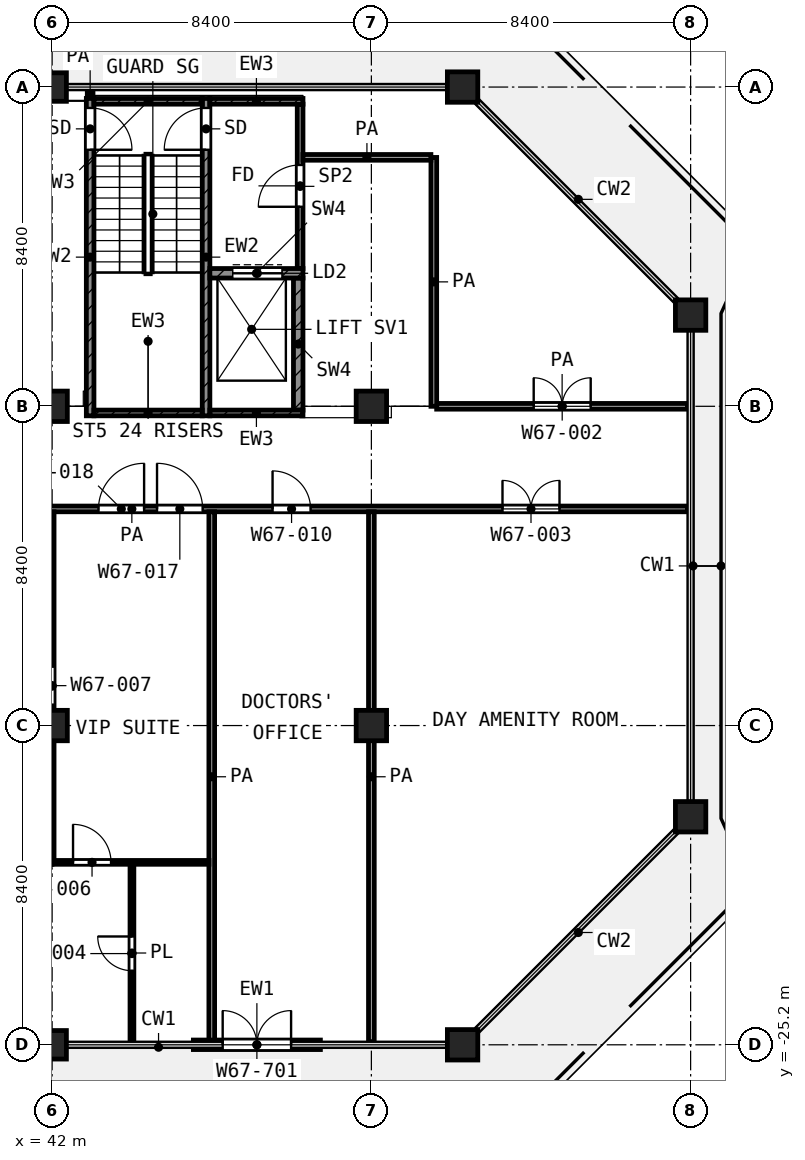
"""IFC4 building model, lengths in metres.
Left out: names, types, materials, properties, quantities, classifications, styles, units other than length and angle.
Written with IfcOpenShell. Run it as: python <this file> out.ifc"""

import sys

from ifc_helpers import new_model, si_unit, direction, frame, frame_2d, origin, origin_2d, place, context, subcontext, project, spatial, rectangle, extrude, element, fill, save


model = new_model("IFC4")
c1 = context("Model", 3, precision=1e-05, world=origin(), true_north=direction((0.0, 1.0)))
c2 = subcontext(c1, "Body", "Model", "MODEL_VIEW")
j1 = project(units=[si_unit("LENGTHUNIT", "METRE"), si_unit("PLANEANGLEUNIT", "RADIAN")], contexts=[c1])
p1 = place(None, origin())
s1 = spatial("IfcSite", under=j1, at=p1, CompositionType="ELEMENT")
p2 = place(p1, origin())
s2 = spatial("IfcBuilding", under=s1, at=p2, CompositionType="ELEMENT")
p3 = place(p2, frame((0.0, 0.0, 290.2)))
s3 = spatial("IfcBuildingStorey", under=s2, at=p3, CompositionType="ELEMENT", Elevation=290.2)
p4 = place(p3, frame((42.0, 0.0, 0.0), z_axis=(0.0, 0.0, 1.0), x_axis=(1.0, 0.0, 0.0)))
e1 = element("IfcColumn", 1, at=p4, inside=s3, PredefinedType="COLUMN", context=c2, shape_type="SweptSolid", body=[
    extrude(rectangle(XDim=0.75, YDim=0.75, at=origin_2d()), origin(), (0.0, 0.0, 1.0), 4.2),
])
for number, where, z_axis, x_axis in (
    (2, (52.8, 0.0, 0.0), (0.0, 0.0, 1.0), (1.0, 0.0, 0.0)),
    (3, (58.8, -6.0, 0.0), (0.0, 0.0, 1.0), (1.0, 0.0, 0.0)),
    (4, (42.0, -8.4, 0.0), (0.0, 0.0, 1.0), (1.0, 0.0, 0.0)),
    (5, (50.4, -8.4, 0.0), (0.0, 0.0, 1.0), (1.0, 0.0, 0.0)),
    (6, (42.0, -16.8, 0.0), (0.0, 0.0, 1.0), (1.0, 0.0, 0.0)),
    (7, (50.4, -16.8, 0.0), (0.0, 0.0, 1.0), (1.0, 0.0, 0.0)),
    (8, (58.8, -19.2, 0.0), (0.0, 0.0, 1.0), (1.0, 0.0, 0.0)),
):
    element("IfcColumn", number, at=place(p3, frame(where, z_axis=z_axis, x_axis=x_axis)), inside=s3, PredefinedType="COLUMN", context=c2, shape_type="SweptSolid", body=[
        extrude(rectangle(XDim=0.8, YDim=0.8, at=origin_2d()), origin(), (0.0, 0.0, 1.0), 4.2),
    ])
p5 = place(p3, frame((42.0, -25.2, 0.0), z_axis=(0.0, 0.0, 1.0), x_axis=(1.0, 0.0, 0.0)))
e9 = element("IfcColumn", 9, at=p5, inside=s3, PredefinedType="COLUMN", context=c2, shape_type="SweptSolid", body=[
    extrude(rectangle(XDim=0.75, YDim=0.75, at=origin_2d()), origin(), (0.0, 0.0, 1.0), 4.2),
])
p6 = place(p3, frame((52.8, -25.2, 0.0), z_axis=(0.0, 0.0, 1.0), x_axis=(1.0, 0.0, 0.0)))
e10 = element("IfcColumn", 10, at=p6, inside=s3, PredefinedType="COLUMN", context=c2, shape_type="SweptSolid", body=[
    extrude(rectangle(XDim=0.8, YDim=0.8, at=origin_2d()), origin(), (0.0, 0.0, 1.0), 4.2),
])
p7 = place(p3, frame((45.717, -25.2, 0.0), z_axis=(0.0, 0.0, 1.0), x_axis=(1.0, 0.0, 0.0)))
e11 = element("IfcWall", 11, at=p7, inside=s3, PredefinedType="SOLIDWALL", context=c2, shape_type="SweptSolid", body=[
    extrude(rectangle(XDim=3.342, YDim=0.25, at=frame_2d((1.671, 0.0))), origin(), (0.0, 0.0, 1.0), 3.48),
])
p8 = place(p7, frame((0.771, 0.0, 0.0)))
e12 = element("IfcOpeningElement", 12, at=p8, cuts=e11, PredefinedType="OPENING", context=c2, shape_type="SweptSolid", body=[
    extrude(rectangle(XDim=1.8, YDim=2.1, at=frame_2d((0.9, 1.05))), frame((0.0, 0.135, 0.0), z_axis=(0.0, -1.0, 0.0), x_axis=(1.0, 0.0, 0.0)), (0.0, 0.0, 1.0), 0.27),
])
p9 = place(p3, frame((43.0, -8.65, 0.0), z_axis=(0.0, 0.0, 1.0), x_axis=(0.0, 1.0, 0.0)))
e13 = element("IfcWall", 13, at=p9, inside=s3, PredefinedType="SHEAR", context=c2, shape_type="SweptSolid", body=[
    extrude(rectangle(XDim=8.35, YDim=0.2, at=frame_2d((4.175, 0.0))), origin(), (0.0, 0.0, 1.0), 3.6),
])
p10 = place(p9, frame((7.0, 0.0, 0.0)))
e14 = element("IfcOpeningElement", 14, at=p10, cuts=e13, PredefinedType="OPENING", context=c2, shape_type="SweptSolid", body=[
    extrude(rectangle(XDim=1.1, YDim=2.1, at=frame_2d((0.55, 1.05))), frame((0.0, 0.11, 0.0), z_axis=(0.0, -1.0, 0.0), x_axis=(1.0, 0.0, 0.0)), (0.0, 0.0, 1.0), 0.22),
])
p11 = place(p3, frame((46.05, -8.65, 0.0), z_axis=(0.0, 0.0, 1.0), x_axis=(0.0, 1.0, 0.0)))
e15 = element("IfcWall", 15, at=p11, inside=s3, PredefinedType="SHEAR", context=c2, shape_type="SweptSolid", body=[
    extrude(rectangle(XDim=8.35, YDim=0.2, at=frame_2d((4.175, 0.0))), origin(), (0.0, 0.0, 1.0), 3.6),
])
p12 = place(p11, frame((7.0, 0.0, 0.0)))
e16 = element("IfcOpeningElement", 16, at=p12, cuts=e15, PredefinedType="OPENING", context=c2, shape_type="SweptSolid", body=[
    extrude(rectangle(XDim=1.1, YDim=2.1, at=frame_2d((0.55, 1.05))), frame((0.0, 0.11, 0.0), z_axis=(0.0, -1.0, 0.0), x_axis=(1.0, 0.0, 0.0)), (0.0, 0.0, 1.0), 0.22),
])
p13 = place(p3, frame((43.1, -0.375, 0.0), z_axis=(0.0, 0.0, 1.0), x_axis=(1.0, 0.0, 0.0)))
e17 = element("IfcWall", 17, at=p13, inside=s3, PredefinedType="SHEAR", context=c2, shape_type="SweptSolid", body=[
    extrude(rectangle(XDim=2.85, YDim=0.15, at=frame_2d((1.425, 0.0))), origin(), (0.0, 0.0, 1.0), 3.6),
])
p14 = place(p3, frame((46.15, -0.375, 0.0), z_axis=(0.0, 0.0, 1.0), x_axis=(1.0, 0.0, 0.0)))
e18 = element("IfcWall", 18, at=p14, inside=s3, PredefinedType="SHEAR", context=c2, shape_type="SweptSolid", body=[
    extrude(rectangle(XDim=2.45, YDim=0.15, at=frame_2d((1.225, 0.0))), origin(), (0.0, 0.0, 1.0), 3.6),
])
p15 = place(p3, frame((43.1, -8.575, 0.0), z_axis=(0.0, 0.0, 1.0), x_axis=(1.0, 0.0, 0.0)))
e19 = element("IfcWall", 19, at=p15, inside=s3, PredefinedType="SHEAR", context=c2, shape_type="SweptSolid", body=[
    extrude(rectangle(XDim=2.85, YDim=0.15, at=frame_2d((1.425, 0.0))), origin(), (0.0, 0.0, 1.0), 3.6),
])
p16 = place(p3, frame((46.15, -8.575, 0.0), z_axis=(0.0, 0.0, 1.0), x_axis=(1.0, 0.0, 0.0)))
e20 = element("IfcWall", 20, at=p16, inside=s3, PredefinedType="SHEAR", context=c2, shape_type="SweptSolid", body=[
    extrude(rectangle(XDim=2.45, YDim=0.15, at=frame_2d((1.225, 0.0))), origin(), (0.0, 0.0, 1.0), 3.6),
])
p17 = place(p3, frame((46.15, -4.9, 0.0), z_axis=(0.0, 0.0, 1.0), x_axis=(1.0, 0.0, 0.0)))
e21 = element("IfcWall", 21, at=p17, inside=s3, PredefinedType="SHEAR", context=c2, shape_type="SweptSolid", body=[
    extrude(rectangle(XDim=2.45, YDim=0.25, at=frame_2d((1.225, 0.0))), origin(), (0.0, 0.0, 1.0), 3.6),
])
p18 = place(p17, frame((0.6, 0.0, 0.0)))
e22 = element("IfcOpeningElement", 22, at=p18, cuts=e21, PredefinedType="OPENING", context=c2, shape_type="SweptSolid", body=[
    extrude(rectangle(XDim=1.3, YDim=2.1, at=frame_2d((0.65, 1.05))), frame((0.0, 0.135, 0.0), z_axis=(0.0, -1.0, 0.0), x_axis=(1.0, 0.0, 0.0)), (0.0, 0.0, 1.0), 0.27),
])
p19 = place(p3, frame((48.475, -8.5, 0.0), z_axis=(0.0, 0.0, 1.0), x_axis=(0.0, 1.0, 0.0)))
e23 = element("IfcWall", 23, at=p19, inside=s3, PredefinedType="SHEAR", context=c2, shape_type="SweptSolid", body=[
    extrude(rectangle(XDim=3.475, YDim=0.25, at=frame_2d((1.738, 0.0))), origin(), (0.0, 0.0, 1.0), 3.6),
])
p20 = place(p3, frame((48.525, -4.775, 0.0), z_axis=(0.0, 0.0, 1.0), x_axis=(0.0, 1.0, 0.0)))
e24 = element("IfcWall", 24, at=p20, inside=s3, PredefinedType="PARTITIONING", context=c2, shape_type="SweptSolid", body=[
    extrude(rectangle(XDim=4.325, YDim=0.15, at=frame_2d((2.163, 0.0))), origin(), (0.0, 0.0, 1.0), 3.6),
])
p21 = place(p20, frame((1.625, 0.0, 0.0)))
e25 = element("IfcOpeningElement", 25, at=p21, cuts=e24, PredefinedType="OPENING", context=c2, shape_type="SweptSolid", body=[
    extrude(rectangle(XDim=1.1, YDim=2.1, at=frame_2d((0.55, 1.05))), frame((0.0, 0.085, 0.0), z_axis=(0.0, -1.0, 0.0), x_axis=(1.0, 0.0, 0.0)), (0.0, 0.0, 1.0), 0.17),
])
p22 = place(p3, frame((37.875, -20.4, 0.0), z_axis=(0.0, 0.0, 1.0), x_axis=(1.0, 0.0, 0.0)))
e26 = element("IfcWall", 26, at=p22, inside=s3, PredefinedType="PARTITIONING", context=c2, shape_type="SweptSolid", body=[
    extrude(rectangle(XDim=8.25, YDim=0.1, at=frame_2d((4.125, 0.0))), origin(), (0.0, 0.0, 1.0), 3.6),
])
p23 = place(p22, frame((4.675, 0.0, 0.0)))
e27 = element("IfcOpeningElement", 27, at=p23, cuts=e26, PredefinedType="OPENING", context=c2, shape_type="SweptSolid", body=[
    extrude(rectangle(XDim=1.0, YDim=2.1, at=frame_2d((0.5, 1.05))), frame((0.0, 0.06, 0.0), z_axis=(0.0, -1.0, 0.0), x_axis=(1.0, 0.0, 0.0)), (0.0, 0.0, 1.0), 0.12),
])
p24 = place(p3, frame((42.0, -20.35, 0.0), z_axis=(0.0, 0.0, 1.0), x_axis=(0.0, 1.0, 0.0)))
e28 = element("IfcWall", 28, at=p24, inside=s3, PredefinedType="PARTITIONING", context=c2, shape_type="SweptSolid", body=[
    extrude(rectangle(XDim=9.175, YDim=0.1, at=frame_2d((4.587, 0.0))), origin(), (0.0, 0.0, 1.0), 3.6),
])
p25 = place(p24, frame((4.1, 0.0, 0.0)))
e29 = element("IfcOpeningElement", 29, at=p25, cuts=e28, PredefinedType="OPENING", context=c2, shape_type="SweptSolid", body=[
    extrude(rectangle(XDim=1.0, YDim=2.1, at=frame_2d((0.5, 1.05))), frame((0.0, 0.06, 0.0), z_axis=(0.0, -1.0, 0.0), x_axis=(1.0, 0.0, 0.0)), (0.0, 0.0, 1.0), 0.12),
])
p26 = place(p3, frame((44.1, -25.12, 0.0), z_axis=(0.0, 0.0, 1.0), x_axis=(0.0, 1.0, 0.0)))
e30 = element("IfcWall", 30, at=p26, inside=s3, PredefinedType="PARTITIONING", context=c2, shape_type="SweptSolid", body=[
    extrude(rectangle(XDim=4.67, YDim=0.1, at=frame_2d((2.335, 0.0))), origin(), (0.0, 0.0, 1.0), 3.6),
])
p27 = place(p26, frame((1.87, 0.0, 0.0)))
e31 = element("IfcOpeningElement", 31, at=p27, cuts=e30, PredefinedType="OPENING", context=c2, shape_type="SweptSolid", body=[
    extrude(rectangle(XDim=0.9, YDim=2.1, at=frame_2d((0.45, 1.05))), frame((0.0, 0.06, 0.0), z_axis=(0.0, -1.0, 0.0), x_axis=(1.0, 0.0, 0.0)), (0.0, 0.0, 1.0), 0.12),
])
p28 = place(p3, frame((29.475, -11.1, 0.0), z_axis=(0.0, 0.0, 1.0), x_axis=(1.0, 0.0, 0.0)))
e32 = element("IfcWall", 32, at=p28, inside=s3, PredefinedType="PARTITIONING", context=c2, shape_type="SweptSolid", body=[
    extrude(rectangle(XDim=29.245, YDim=0.15, at=frame_2d((14.623, 0.0))), origin(), (0.0, 0.0, 1.0), 3.6),
])
p29 = place(p28, frame((3.525, 0.0, 0.0)))
e33 = element("IfcOpeningElement", 33, at=p29, cuts=e32, PredefinedType="OPENING", context=c2, shape_type="SweptSolid", body=[
    extrude(rectangle(XDim=1.2, YDim=2.1, at=frame_2d((0.6, 1.05))), frame((0.0, 0.085, 0.0), z_axis=(0.0, -1.0, 0.0), x_axis=(1.0, 0.0, 0.0)), (0.0, 0.0, 1.0), 0.17),
])
p30 = place(p28, frame((15.285, 0.0, 0.0)))
e34 = element("IfcOpeningElement", 34, at=p30, cuts=e32, PredefinedType="OPENING", context=c2, shape_type="SweptSolid", body=[
    extrude(rectangle(XDim=1.2, YDim=2.1, at=frame_2d((0.6, 1.05))), frame((0.0, 0.085, 0.0), z_axis=(0.0, -1.0, 0.0), x_axis=(1.0, 0.0, 0.0)), (0.0, 0.0, 1.0), 0.17),
])
p31 = place(p28, frame((13.745, 0.0, 0.0)))
e35 = element("IfcOpeningElement", 35, at=p31, cuts=e32, PredefinedType="OPENING", context=c2, shape_type="SweptSolid", body=[
    extrude(rectangle(XDim=1.2, YDim=2.1, at=frame_2d((0.6, 1.05))), frame((0.0, 0.085, 0.0), z_axis=(0.0, -1.0, 0.0), x_axis=(1.0, 0.0, 0.0)), (0.0, 0.0, 1.0), 0.17),
])
p32 = place(p28, frame((18.325, 0.0, 0.0)))
e36 = element("IfcOpeningElement", 36, at=p32, cuts=e32, PredefinedType="OPENING", context=c2, shape_type="SweptSolid", body=[
    extrude(rectangle(XDim=1.0, YDim=2.1, at=frame_2d((0.5, 1.05))), frame((0.0, 0.085, 0.0), z_axis=(0.0, -1.0, 0.0), x_axis=(1.0, 0.0, 0.0)), (0.0, 0.0, 1.0), 0.17),
])
p33 = place(p28, frame((24.375, 0.0, 0.0)))
e37 = element("IfcOpeningElement", 37, at=p33, cuts=e32, PredefinedType="OPENING", context=c2, shape_type="SweptSolid", body=[
    extrude(rectangle(XDim=1.5, YDim=2.1, at=frame_2d((0.75, 1.05))), frame((0.0, 0.085, 0.0), z_axis=(0.0, -1.0, 0.0), x_axis=(1.0, 0.0, 0.0)), (0.0, 0.0, 1.0), 0.17),
])
p34 = place(p3, frame((52.118, -8.4, 0.0), z_axis=(0.0, 0.0, 1.0), x_axis=(1.0, 0.0, 0.0)))
e38 = element("IfcWall", 38, at=p34, inside=s3, PredefinedType="PARTITIONING", context=c2, shape_type="SweptSolid", body=[
    extrude(rectangle(XDim=6.602, YDim=0.15, at=frame_2d((3.301, 0.0))), origin(), (0.0, 0.0, 1.0), 3.6),
])
p35 = place(p34, frame((2.553, 0.0, 0.0)))
e39 = element("IfcOpeningElement", 39, at=p35, cuts=e38, PredefinedType="OPENING", context=c2, shape_type="SweptSolid", body=[
    extrude(rectangle(XDim=1.5, YDim=2.1, at=frame_2d((0.75, 1.05))), frame((0.0, 0.085, 0.0), z_axis=(0.0, -1.0, 0.0), x_axis=(1.0, 0.0, 0.0)), (0.0, 0.0, 1.0), 0.17),
])
p36 = place(p3, frame((48.6, -1.85, 0.0), z_axis=(0.0, 0.0, 1.0), x_axis=(1.0, 0.0, 0.0)))
e40 = element("IfcWall", 40, at=p36, inside=s3, PredefinedType="PARTITIONING", context=c2, shape_type="SweptSolid", body=[
    extrude(rectangle(XDim=3.366, YDim=0.15, at=frame_2d((1.683, 0.0))), origin(), (0.0, 0.0, 1.0), 3.6),
])
p37 = place(p3, frame((43.0, -0.27, 0.0), z_axis=(0.0, 0.0, 1.0), x_axis=(0.0, 1.0, 0.0)))
e41 = element("IfcWall", 41, at=p37, inside=s3, PredefinedType="PARTITIONING", context=c2, shape_type="SweptSolid", body=[
    extrude(rectangle(XDim=0.19, YDim=0.15, at=frame_2d((0.095, 0.0))), origin(), (0.0, 0.0, 1.0), 3.6),
])
for number, where, z_axis, x_axis in (
    (42, (46.2, -25.12, 0.0), (0.0, 0.0, 1.0), (0.0, 1.0, 0.0)),
    (43, (50.4, -25.12, 0.0), (0.0, 0.0, 1.0), (0.0, 1.0, 0.0)),
):
    element("IfcWall", number, at=place(p3, frame(where, z_axis=z_axis, x_axis=x_axis)), inside=s3, PredefinedType="PARTITIONING", context=c2, shape_type="SweptSolid", body=[
        extrude(rectangle(XDim=13.945, YDim=0.15, at=frame_2d((6.973, 0.0))), origin(), (0.0, 0.0, 1.0), 3.6),
    ])
p38 = place(p3, frame((52.043, -8.4, 0.0), z_axis=(0.0, 0.0, 1.0), x_axis=(0.0, 1.0, 0.0)))
e44 = element("IfcWall", 44, at=p38, inside=s3, PredefinedType="PARTITIONING", context=c2, shape_type="SweptSolid", body=[
    extrude(rectangle(XDim=6.548, YDim=0.15, at=frame_2d((3.274, 0.0))), origin(), (0.0, 0.0, 1.0), 3.6),
])
p39 = place(p8, origin())
e45 = element("IfcDoor", 45, at=p39, inside=s3, OperationType="DOUBLE_DOOR_SINGLE_SWING", PredefinedType="DOOR", context=c2, shape_type="SweptSolid", body=[
    extrude(rectangle(XDim=1.8, YDim=2.1, at=frame_2d((0.9, 1.05))), frame((0.0, 0.025, 0.0), z_axis=(0.0, -1.0, 0.0), x_axis=(1.0, 0.0, 0.0)), (0.0, 0.0, 1.0), 0.05),
])
fill(e12, e45)
p40 = place(p10, frame((1.1, 0.0, 0.0), z_axis=(0.0, 0.0, 1.0), x_axis=(-1.0, 0.0, 0.0)))
e46 = element("IfcDoor", 46, at=p40, inside=s3, OperationType="SINGLE_SWING_LEFT", PredefinedType="DOOR", context=c2, shape_type="SweptSolid", body=[
    extrude(rectangle(XDim=1.1, YDim=2.1, at=frame_2d((0.55, 1.05))), frame((0.0, 0.025, 0.0), z_axis=(0.0, -1.0, 0.0), x_axis=(1.0, 0.0, 0.0)), (0.0, 0.0, 1.0), 0.05),
])
fill(e14, e46)
p41 = place(p12, origin())
e47 = element("IfcDoor", 47, at=p41, inside=s3, OperationType="SINGLE_SWING_LEFT", PredefinedType="DOOR", context=c2, shape_type="SweptSolid", body=[
    extrude(rectangle(XDim=1.1, YDim=2.1, at=frame_2d((0.55, 1.05))), frame((0.0, 0.025, 0.0), z_axis=(0.0, -1.0, 0.0), x_axis=(1.0, 0.0, 0.0)), (0.0, 0.0, 1.0), 0.05),
])
fill(e16, e47)
p42 = place(p18, origin())
e48 = element("IfcDoor", 48, at=p42, inside=s3, OperationType="DOUBLE_DOOR_SLIDING", PredefinedType="DOOR", context=c2, shape_type="SweptSolid", body=[
    extrude(rectangle(XDim=1.3, YDim=2.1, at=frame_2d((0.65, 1.05))), frame((0.0, 0.025, 0.0), z_axis=(0.0, -1.0, 0.0), x_axis=(1.0, 0.0, 0.0)), (0.0, 0.0, 1.0), 0.05),
])
fill(e22, e48)
p43 = place(p21, origin())
e49 = element("IfcDoor", 49, at=p43, inside=s3, OperationType="SINGLE_SWING_LEFT", PredefinedType="DOOR", context=c2, shape_type="SweptSolid", body=[
    extrude(rectangle(XDim=1.1, YDim=2.1, at=frame_2d((0.55, 1.05))), frame((0.0, 0.025, 0.0), z_axis=(0.0, -1.0, 0.0), x_axis=(1.0, 0.0, 0.0)), (0.0, 0.0, 1.0), 0.05),
])
fill(e25, e49)
p44 = place(p35, origin())
e50 = element("IfcDoor", 50, at=p44, inside=s3, OperationType="DOUBLE_DOOR_SINGLE_SWING", PredefinedType="DOOR", context=c2, shape_type="SweptSolid", body=[
    extrude(rectangle(XDim=1.5, YDim=2.1, at=frame_2d((0.75, 1.05))), frame((0.0, 0.025, 0.0), z_axis=(0.0, -1.0, 0.0), x_axis=(1.0, 0.0, 0.0)), (0.0, 0.0, 1.0), 0.05),
])
fill(e39, e50)
p45 = place(p30, origin())
e51 = element("IfcDoor", 51, at=p45, inside=s3, OperationType="SINGLE_SWING_LEFT", PredefinedType="DOOR", context=c2, shape_type="SweptSolid", body=[
    extrude(rectangle(XDim=1.2, YDim=2.1, at=frame_2d((0.6, 1.05))), frame((0.0, 0.025, 0.0), z_axis=(0.0, -1.0, 0.0), x_axis=(1.0, 0.0, 0.0)), (0.0, 0.0, 1.0), 0.05),
])
fill(e34, e51)
p46 = place(p31, origin())
e52 = element("IfcDoor", 52, at=p46, inside=s3, OperationType="SINGLE_SWING_RIGHT", PredefinedType="DOOR", context=c2, shape_type="SweptSolid", body=[
    extrude(rectangle(XDim=1.2, YDim=2.1, at=frame_2d((0.6, 1.05))), frame((0.0, 0.025, 0.0), z_axis=(0.0, -1.0, 0.0), x_axis=(1.0, 0.0, 0.0)), (0.0, 0.0, 1.0), 0.05),
])
fill(e35, e52)
p47 = place(p23, origin())
e53 = element("IfcDoor", 53, at=p47, inside=s3, OperationType="SINGLE_SWING_LEFT", PredefinedType="DOOR", context=c2, shape_type="SweptSolid", body=[
    extrude(rectangle(XDim=1.0, YDim=2.1, at=frame_2d((0.5, 1.05))), frame((0.0, 0.025, 0.0), z_axis=(0.0, -1.0, 0.0), x_axis=(1.0, 0.0, 0.0)), (0.0, 0.0, 1.0), 0.05),
])
fill(e27, e53)
p48 = place(p25, origin())
e54 = element("IfcDoor", 54, at=p48, inside=s3, OperationType="SINGLE_SWING_RIGHT", PredefinedType="DOOR", context=c2, shape_type="SweptSolid", body=[
    extrude(rectangle(XDim=1.0, YDim=2.1, at=frame_2d((0.5, 1.05))), frame((0.0, 0.025, 0.0), z_axis=(0.0, -1.0, 0.0), x_axis=(1.0, 0.0, 0.0)), (0.0, 0.0, 1.0), 0.05),
])
fill(e29, e54)
p49 = place(p27, origin())
e55 = element("IfcDoor", 55, at=p49, inside=s3, OperationType="SINGLE_SWING_RIGHT", PredefinedType="DOOR", context=c2, shape_type="SweptSolid", body=[
    extrude(rectangle(XDim=0.9, YDim=2.1, at=frame_2d((0.45, 1.05))), frame((0.0, 0.025, 0.0), z_axis=(0.0, -1.0, 0.0), x_axis=(1.0, 0.0, 0.0)), (0.0, 0.0, 1.0), 0.05),
])
fill(e31, e55)
p50 = place(p32, origin())
e56 = element("IfcDoor", 56, at=p50, inside=s3, OperationType="SINGLE_SWING_LEFT", PredefinedType="DOOR", context=c2, shape_type="SweptSolid", body=[
    extrude(rectangle(XDim=1.0, YDim=2.1, at=frame_2d((0.5, 1.05))), frame((0.0, 0.025, 0.0), z_axis=(0.0, -1.0, 0.0), x_axis=(1.0, 0.0, 0.0)), (0.0, 0.0, 1.0), 0.05),
])
fill(e36, e56)
p51 = place(p33, origin())
e57 = element("IfcDoor", 57, at=p51, inside=s3, OperationType="DOUBLE_DOOR_SINGLE_SWING", PredefinedType="DOOR", context=c2, shape_type="SweptSolid", body=[
    extrude(rectangle(XDim=1.5, YDim=2.1, at=frame_2d((0.75, 1.05))), frame((0.0, 0.025, 0.0), z_axis=(0.0, -1.0, 0.0), x_axis=(1.0, 0.0, 0.0)), (0.0, 0.0, 1.0), 0.05),
])
fill(e37, e57)
save(model, sys.argv[1])
